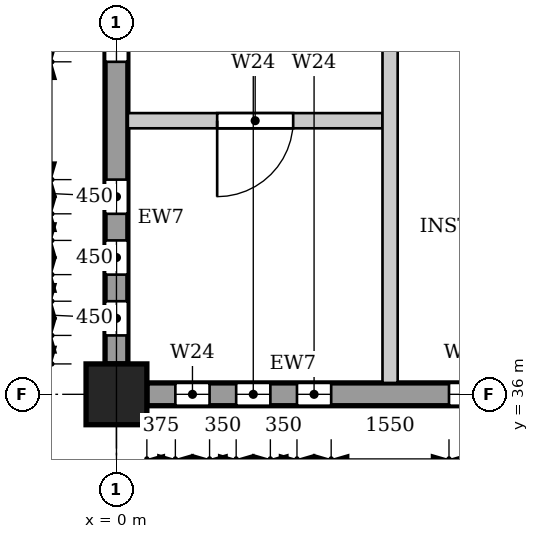
"""IFC4 building model, lengths in metres.
Left out: names, types, materials, properties, quantities, classifications, styles, units other than length and angle.
Written with IfcOpenShell. Run it as: python <this file> out.ifc"""

import sys

from ifc_helpers import new_model, si_unit, direction, frame, frame_2d, origin, origin_2d, place, context, subcontext, project, spatial, polyline, rectangle, outline, extrude, element, fill, save


model = new_model("IFC4")
c1 = context("Model", 3, precision=1e-05, world=origin(), true_north=direction((0.0, 1.0)))
c2 = subcontext(c1, "Body", "Model", "MODEL_VIEW")
j1 = project(units=[si_unit("LENGTHUNIT", "METRE"), si_unit("PLANEANGLEUNIT", "RADIAN")], contexts=[c1])
p1 = place(None, origin())
s1 = spatial("IfcSite", under=j1, at=p1, CompositionType="ELEMENT")
p2 = place(p1, origin())
s2 = spatial("IfcBuilding", under=s1, at=p2, CompositionType="ELEMENT")
p3 = place(p2, frame((0.0, 0.0, 49.8)))
s3 = spatial("IfcBuildingStorey", under=s2, at=p3, CompositionType="ELEMENT", Elevation=49.8)
p4 = place(p3, frame((0.0, 36.0, 0.0), z_axis=(0.0, 0.0, 1.0), x_axis=(1.0, 0.0, 0.0)))
e1 = element("IfcColumn", 1, at=p4, inside=s3, PredefinedType="COLUMN", context=c2, shape_type="SweptSolid", body=[
    extrude(rectangle(XDim=0.8, YDim=0.8, at=origin_2d()), origin(), (0.0, 0.0, 1.0), 4.5),
])
p5 = place(p3, frame((0.0, 36.4, 0.0), z_axis=(0.0, 0.0, 1.0), x_axis=(0.0, 1.0, 0.0)))
e2 = element("IfcWall", 2, at=p5, inside=s3, PredefinedType="STANDARD", context=c2, shape_type="SweptSolid", body=[
    extrude(rectangle(XDim=6.4, YDim=0.3, at=frame_2d((3.2, 0.0))), origin(), (0.0, 0.0, 1.0), 3.6),
])
p6 = place(p5, frame((0.375, 0.0, 0.9)))
e3 = element("IfcOpeningElement", 3, at=p6, cuts=e2, PredefinedType="OPENING", context=c2, shape_type="SweptSolid", body=[
    extrude(outline(polyline([(0.0, 0.0), (0.45, 0.0), (0.45, 2.35), (0.225, 2.6), (0.0, 2.35), (0.0, 0.0)])), frame((0.0, 0.16, 0.0), z_axis=(0.0, -1.0, 0.0), x_axis=(1.0, 0.0, 0.0)), (0.0, 0.0, 1.0), 0.32),
])
p7 = place(p5, frame((1.175, 0.0, 0.9)))
e4 = element("IfcOpeningElement", 4, at=p7, cuts=e2, PredefinedType="OPENING", context=c2, shape_type="SweptSolid", body=[
    extrude(outline(polyline([(0.0, 0.0), (0.45, 0.0), (0.45, 2.35), (0.225, 2.6), (0.0, 2.35), (0.0, 0.0)])), frame((0.0, 0.16, 0.0), z_axis=(0.0, -1.0, 0.0), x_axis=(1.0, 0.0, 0.0)), (0.0, 0.0, 1.0), 0.32),
])
p8 = place(p5, frame((1.975, 0.0, 0.9)))
e5 = element("IfcOpeningElement", 5, at=p8, cuts=e2, PredefinedType="OPENING", context=c2, shape_type="SweptSolid", body=[
    extrude(outline(polyline([(0.0, 0.0), (0.45, 0.0), (0.45, 2.35), (0.225, 2.6), (0.0, 2.35), (0.0, 0.0)])), frame((0.0, 0.16, 0.0), z_axis=(0.0, -1.0, 0.0), x_axis=(1.0, 0.0, 0.0)), (0.0, 0.0, 1.0), 0.32),
])
p9 = place(p5, frame((3.975, 0.0, 0.9)))
e6 = element("IfcOpeningElement", 6, at=p9, cuts=e2, PredefinedType="OPENING", context=c2, shape_type="SweptSolid", body=[
    extrude(outline(polyline([(0.0, 0.0), (0.45, 0.0), (0.45, 2.35), (0.225, 2.6), (0.0, 2.35), (0.0, 0.0)])), frame((0.0, 0.16, 0.0), z_axis=(0.0, -1.0, 0.0), x_axis=(1.0, 0.0, 0.0)), (0.0, 0.0, 1.0), 0.32),
])
p10 = place(p5, frame((4.775, 0.0, 0.9)))
e7 = element("IfcOpeningElement", 7, at=p10, cuts=e2, PredefinedType="OPENING", context=c2, shape_type="SweptSolid", body=[
    extrude(outline(polyline([(0.0, 0.0), (0.45, 0.0), (0.45, 2.35), (0.225, 2.6), (0.0, 2.35), (0.0, 0.0)])), frame((0.0, 0.16, 0.0), z_axis=(0.0, -1.0, 0.0), x_axis=(1.0, 0.0, 0.0)), (0.0, 0.0, 1.0), 0.32),
])
p11 = place(p5, frame((5.575, 0.0, 0.9)))
e8 = element("IfcOpeningElement", 8, at=p11, cuts=e2, PredefinedType="OPENING", context=c2, shape_type="SweptSolid", body=[
    extrude(outline(polyline([(0.0, 0.0), (0.45, 0.0), (0.45, 2.35), (0.225, 2.6), (0.0, 2.35), (0.0, 0.0)])), frame((0.0, 0.16, 0.0), z_axis=(0.0, -1.0, 0.0), x_axis=(1.0, 0.0, 0.0)), (0.0, 0.0, 1.0), 0.32),
])
p12 = place(p3, frame((0.4, 36.0, 0.0), z_axis=(0.0, 0.0, 1.0), x_axis=(1.0, 0.0, 0.0)))
e9 = element("IfcWall", 9, at=p12, inside=s3, PredefinedType="STANDARD", context=c2, shape_type="SweptSolid", body=[
    extrude(rectangle(XDim=6.4, YDim=0.3, at=frame_2d((3.2, 0.0))), origin(), (0.0, 0.0, 1.0), 3.6),
])
p13 = place(p12, frame((0.375, 0.0, 0.9)))
e10 = element("IfcOpeningElement", 10, at=p13, cuts=e9, PredefinedType="OPENING", context=c2, shape_type="SweptSolid", body=[
    extrude(outline(polyline([(0.0, 0.0), (0.45, 0.0), (0.45, 2.35), (0.225, 2.6), (0.0, 2.35), (0.0, 0.0)])), frame((0.0, 0.16, 0.0), z_axis=(0.0, -1.0, 0.0), x_axis=(1.0, 0.0, 0.0)), (0.0, 0.0, 1.0), 0.32),
])
p14 = place(p12, frame((1.175, 0.0, 0.9)))
e11 = element("IfcOpeningElement", 11, at=p14, cuts=e9, PredefinedType="OPENING", context=c2, shape_type="SweptSolid", body=[
    extrude(outline(polyline([(0.0, 0.0), (0.45, 0.0), (0.45, 2.35), (0.225, 2.6), (0.0, 2.35), (0.0, 0.0)])), frame((0.0, 0.16, 0.0), z_axis=(0.0, -1.0, 0.0), x_axis=(1.0, 0.0, 0.0)), (0.0, 0.0, 1.0), 0.32),
])
p15 = place(p12, frame((1.975, 0.0, 0.9)))
e12 = element("IfcOpeningElement", 12, at=p15, cuts=e9, PredefinedType="OPENING", context=c2, shape_type="SweptSolid", body=[
    extrude(outline(polyline([(0.0, 0.0), (0.45, 0.0), (0.45, 2.35), (0.225, 2.6), (0.0, 2.35), (0.0, 0.0)])), frame((0.0, 0.16, 0.0), z_axis=(0.0, -1.0, 0.0), x_axis=(1.0, 0.0, 0.0)), (0.0, 0.0, 1.0), 0.32),
])
p16 = place(p12, frame((3.975, 0.0, 0.9)))
e13 = element("IfcOpeningElement", 13, at=p16, cuts=e9, PredefinedType="OPENING", context=c2, shape_type="SweptSolid", body=[
    extrude(outline(polyline([(0.0, 0.0), (0.45, 0.0), (0.45, 2.35), (0.225, 2.6), (0.0, 2.35), (0.0, 0.0)])), frame((0.0, 0.16, 0.0), z_axis=(0.0, -1.0, 0.0), x_axis=(1.0, 0.0, 0.0)), (0.0, 0.0, 1.0), 0.32),
])
p17 = place(p12, frame((4.775, 0.0, 0.9)))
e14 = element("IfcOpeningElement", 14, at=p17, cuts=e9, PredefinedType="OPENING", context=c2, shape_type="SweptSolid", body=[
    extrude(outline(polyline([(0.0, 0.0), (0.45, 0.0), (0.45, 2.35), (0.225, 2.6), (0.0, 2.35), (0.0, 0.0)])), frame((0.0, 0.16, 0.0), z_axis=(0.0, -1.0, 0.0), x_axis=(1.0, 0.0, 0.0)), (0.0, 0.0, 1.0), 0.32),
])
p18 = place(p12, frame((5.575, 0.0, 0.9)))
e15 = element("IfcOpeningElement", 15, at=p18, cuts=e9, PredefinedType="OPENING", context=c2, shape_type="SweptSolid", body=[
    extrude(outline(polyline([(0.0, 0.0), (0.45, 0.0), (0.45, 2.35), (0.225, 2.6), (0.0, 2.35), (0.0, 0.0)])), frame((0.0, 0.16, 0.0), z_axis=(0.0, -1.0, 0.0), x_axis=(1.0, 0.0, 0.0)), (0.0, 0.0, 1.0), 0.32),
])
p19 = place(p3, frame((0.15, 39.6, 0.0), z_axis=(0.0, 0.0, 1.0), x_axis=(1.0, 0.0, 0.0)))
e16 = element("IfcWall", 16, at=p19, inside=s3, PredefinedType="PARTITIONING", context=c2, shape_type="SweptSolid", body=[
    extrude(outline(polyline([(0.0, 0.0), (3.35, 0.0), (3.35, 4.2), (0.05, 4.2), (0.05, 3.6), (0.0, 3.6), (0.0, 0.0)])), frame((0.0, 0.1, 0.0), z_axis=(0.0, -1.0, 0.0), x_axis=(1.0, 0.0, 0.0)), (0.0, 0.0, 1.0), 0.2),
])
p20 = place(p19, frame((1.175, 0.0, 0.0)))
e17 = element("IfcOpeningElement", 17, at=p20, cuts=e16, PredefinedType="OPENING", context=c2, shape_type="SweptSolid", body=[
    extrude(rectangle(XDim=1.0, YDim=2.1, at=frame_2d((0.5, 1.05))), frame((0.0, 0.11, 0.0), z_axis=(0.0, -1.0, 0.0), x_axis=(1.0, 0.0, 0.0)), (0.0, 0.0, 1.0), 0.22),
])
p21 = place(p3, frame((3.6, 36.15, 0.0), z_axis=(0.0, 0.0, 1.0), x_axis=(0.0, 1.0, 0.0)))
e18 = element("IfcWall", 18, at=p21, inside=s3, PredefinedType="PARTITIONING", context=c2, shape_type="SweptSolid", body=[
    extrude(outline(polyline([(0.0, 0.0), (10.65, 0.0), (10.65, 4.2), (7.275, 4.2), (7.275, 3.55), (6.825, 3.55), (6.825, 4.2), (0.05, 4.2), (0.05, 3.6), (0.0, 3.6), (0.0, 0.0)])), frame((0.0, 0.1, 0.0), z_axis=(0.0, -1.0, 0.0), x_axis=(1.0, 0.0, 0.0)), (0.0, 0.0, 1.0), 0.2),
])
p22 = place(p13, origin())
e19 = element("IfcWindow", 19, at=p22, inside=s3, PartitioningType="SINGLE_PANEL", PredefinedType="WINDOW", context=c2, shape_type="SweptSolid", body=[
    extrude(outline(polyline([(0.0, 0.0), (0.45, 0.0), (0.45, 2.35), (0.225, 2.6), (0.0, 2.35), (0.0, 0.0)])), frame((0.0, 0.03, 0.0), z_axis=(0.0, -1.0, 0.0), x_axis=(1.0, 0.0, 0.0)), (0.0, 0.0, 1.0), 0.06),
])
fill(e10, e19)
p23 = place(p14, origin())
e20 = element("IfcWindow", 20, at=p23, inside=s3, PartitioningType="SINGLE_PANEL", PredefinedType="WINDOW", context=c2, shape_type="SweptSolid", body=[
    extrude(outline(polyline([(0.0, 0.0), (0.45, 0.0), (0.45, 2.35), (0.225, 2.6), (0.0, 2.35), (0.0, 0.0)])), frame((0.0, 0.03, 0.0), z_axis=(0.0, -1.0, 0.0), x_axis=(1.0, 0.0, 0.0)), (0.0, 0.0, 1.0), 0.06),
])
fill(e11, e20)
p24 = place(p15, origin())
e21 = element("IfcWindow", 21, at=p24, inside=s3, PartitioningType="SINGLE_PANEL", PredefinedType="WINDOW", context=c2, shape_type="SweptSolid", body=[
    extrude(outline(polyline([(0.0, 0.0), (0.45, 0.0), (0.45, 2.35), (0.225, 2.6), (0.0, 2.35), (0.0, 0.0)])), frame((0.0, 0.03, 0.0), z_axis=(0.0, -1.0, 0.0), x_axis=(1.0, 0.0, 0.0)), (0.0, 0.0, 1.0), 0.06),
])
fill(e12, e21)
p25 = place(p16, origin())
e22 = element("IfcWindow", 22, at=p25, inside=s3, PartitioningType="SINGLE_PANEL", PredefinedType="WINDOW", context=c2, shape_type="SweptSolid", body=[
    extrude(outline(polyline([(0.0, 0.0), (0.45, 0.0), (0.45, 2.35), (0.225, 2.6), (0.0, 2.35), (0.0, 0.0)])), frame((0.0, 0.03, 0.0), z_axis=(0.0, -1.0, 0.0), x_axis=(1.0, 0.0, 0.0)), (0.0, 0.0, 1.0), 0.06),
])
fill(e13, e22)
p26 = place(p6, origin())
e23 = element("IfcWindow", 23, at=p26, inside=s3, PartitioningType="SINGLE_PANEL", PredefinedType="WINDOW", context=c2, shape_type="SweptSolid", body=[
    extrude(outline(polyline([(0.0, 0.0), (0.45, 0.0), (0.45, 2.35), (0.225, 2.6), (0.0, 2.35), (0.0, 0.0)])), frame((0.0, 0.03, 0.0), z_axis=(0.0, -1.0, 0.0), x_axis=(1.0, 0.0, 0.0)), (0.0, 0.0, 1.0), 0.06),
])
fill(e3, e23)
p27 = place(p7, origin())
e24 = element("IfcWindow", 24, at=p27, inside=s3, PartitioningType="SINGLE_PANEL", PredefinedType="WINDOW", context=c2, shape_type="SweptSolid", body=[
    extrude(outline(polyline([(0.0, 0.0), (0.45, 0.0), (0.45, 2.35), (0.225, 2.6), (0.0, 2.35), (0.0, 0.0)])), frame((0.0, 0.03, 0.0), z_axis=(0.0, -1.0, 0.0), x_axis=(1.0, 0.0, 0.0)), (0.0, 0.0, 1.0), 0.06),
])
fill(e4, e24)
p28 = place(p8, origin())
e25 = element("IfcWindow", 25, at=p28, inside=s3, PartitioningType="SINGLE_PANEL", PredefinedType="WINDOW", context=c2, shape_type="SweptSolid", body=[
    extrude(outline(polyline([(0.0, 0.0), (0.45, 0.0), (0.45, 2.35), (0.225, 2.6), (0.0, 2.35), (0.0, 0.0)])), frame((0.0, 0.03, 0.0), z_axis=(0.0, -1.0, 0.0), x_axis=(1.0, 0.0, 0.0)), (0.0, 0.0, 1.0), 0.06),
])
fill(e5, e25)
p29 = place(p9, origin())
e26 = element("IfcWindow", 26, at=p29, inside=s3, PartitioningType="SINGLE_PANEL", PredefinedType="WINDOW", context=c2, shape_type="SweptSolid", body=[
    extrude(outline(polyline([(0.0, 0.0), (0.45, 0.0), (0.45, 2.35), (0.225, 2.6), (0.0, 2.35), (0.0, 0.0)])), frame((0.0, 0.03, 0.0), z_axis=(0.0, -1.0, 0.0), x_axis=(1.0, 0.0, 0.0)), (0.0, 0.0, 1.0), 0.06),
])
fill(e6, e26)
p30 = place(p20, frame((1.0, 0.0, 0.0), z_axis=(0.0, 0.0, 1.0), x_axis=(-1.0, 0.0, 0.0)))
e27 = element("IfcDoor", 27, at=p30, inside=s3, OperationType="SINGLE_SWING_RIGHT", PredefinedType="DOOR", context=c2, shape_type="SweptSolid", body=[
    extrude(rectangle(XDim=1.0, YDim=2.1, at=frame_2d((0.5, 1.05))), frame((0.0, 0.025, 0.0), z_axis=(0.0, -1.0, 0.0), x_axis=(1.0, 0.0, 0.0)), (0.0, 0.0, 1.0), 0.05),
])
fill(e17, e27)
save(model, sys.argv[1])
